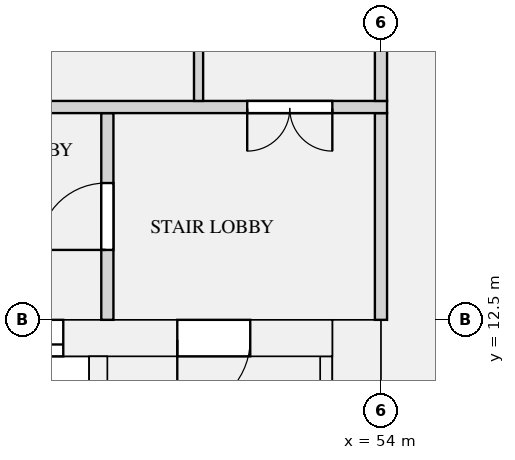
"""IFC4 building model, lengths in metres.
Left out: names, types, materials, properties, quantities, classifications, styles, units other than length and angle.
Written with IfcOpenShell. Run it as: python <this file> out.ifc"""

import sys

from ifc_helpers import new_model, si_unit, direction, frame, frame_2d, origin, place, context, subcontext, project, spatial, rectangle, extrude, element, fill, save


model = new_model("IFC4")
c1 = context("Model", 3, precision=1e-05, world=origin(), true_north=direction((0.0, 1.0)))
c2 = subcontext(c1, "Body", "Model", "MODEL_VIEW")
j1 = project(units=[si_unit("LENGTHUNIT", "METRE"), si_unit("PLANEANGLEUNIT", "RADIAN")], contexts=[c1])
p1 = place(None, origin())
s1 = spatial("IfcSite", under=j1, at=p1, CompositionType="ELEMENT")
p2 = place(p1, origin())
s2 = spatial("IfcBuilding", under=s1, at=p2, CompositionType="ELEMENT")
p3 = place(p2, frame((0.0, 0.0, 111.9)))
s3 = spatial("IfcBuildingStorey", under=s2, at=p3, CompositionType="ELEMENT", Elevation=111.9)
p4 = place(p3, frame((53.6, 0.0, 0.0), z_axis=(0.0, 0.0, 1.0), x_axis=(0.0, 1.0, 0.0)))
e1 = element("IfcWall", 1, at=p4, inside=s3, PredefinedType="SHEAR", context=c2, shape_type="SweptSolid", body=[
    extrude(rectangle(XDim=12.5, YDim=0.8, at=frame_2d((6.25, 0.0))), origin(), (0.0, 0.0, 1.0), 3.15),
])
p5 = place(p3, frame((18.8, 12.2, 0.0), z_axis=(0.0, 0.0, 1.0), x_axis=(1.0, 0.0, 0.0)))
e2 = element("IfcWall", 2, at=p5, inside=s3, PredefinedType="SHEAR", context=c2, shape_type="SweptSolid", body=[
    extrude(rectangle(XDim=34.4, YDim=0.6, at=frame_2d((17.2, 0.0))), origin(), (0.0, 0.0, 1.0), 3.15),
])
p6 = place(p5, frame((24.375, 0.0, 0.0)))
e3 = element("IfcOpeningElement", 3, at=p6, cuts=e2, PredefinedType="OPENING", context=c2, shape_type="SweptSolid", body=[
    extrude(rectangle(XDim=1.1, YDim=2.1, at=frame_2d((0.55, 1.05))), frame((0.0, 0.31, 0.0), z_axis=(0.0, -1.0, 0.0), x_axis=(1.0, 0.0, 0.0)), (0.0, 0.0, 1.0), 0.62),
])
p7 = place(p5, frame((26.625, 0.0, 0.0)))
e4 = element("IfcOpeningElement", 4, at=p7, cuts=e2, PredefinedType="OPENING", context=c2, shape_type="SweptSolid", body=[
    extrude(rectangle(XDim=1.1, YDim=2.1, at=frame_2d((0.55, 1.05))), frame((0.0, 0.31, 0.0), z_axis=(0.0, -1.0, 0.0), x_axis=(1.0, 0.0, 0.0)), (0.0, 0.0, 1.0), 0.62),
])
p8 = place(p5, frame((28.875, 0.0, 0.0)))
e5 = element("IfcOpeningElement", 5, at=p8, cuts=e2, PredefinedType="OPENING", context=c2, shape_type="SweptSolid", body=[
    extrude(rectangle(XDim=1.1, YDim=2.1, at=frame_2d((0.55, 1.05))), frame((0.0, 0.31, 0.0), z_axis=(0.0, -1.0, 0.0), x_axis=(1.0, 0.0, 0.0)), (0.0, 0.0, 1.0), 0.62),
])
p9 = place(p5, frame((8.75, 0.0, 0.0)))
e6 = element("IfcOpeningElement", 6, at=p9, cuts=e2, PredefinedType="OPENING", context=c2, shape_type="SweptSolid", body=[
    extrude(rectangle(XDim=0.9, YDim=2.1, at=frame_2d((0.45, 1.05))), frame((0.0, 0.31, 0.0), z_axis=(0.0, -1.0, 0.0), x_axis=(1.0, 0.0, 0.0)), (0.0, 0.0, 1.0), 0.62),
])
p10 = place(p5, frame((1.35, 0.0, 0.0)))
e7 = element("IfcOpeningElement", 7, at=p10, cuts=e2, PredefinedType="OPENING", context=c2, shape_type="SweptSolid", body=[
    extrude(rectangle(XDim=1.2, YDim=2.1, at=frame_2d((0.6, 1.05))), frame((0.0, 0.31, 0.0), z_axis=(0.0, -1.0, 0.0), x_axis=(1.0, 0.0, 0.0)), (0.0, 0.0, 1.0), 0.62),
])
p11 = place(p5, frame((31.85, 0.0, 0.0)))
e8 = element("IfcOpeningElement", 8, at=p11, cuts=e2, PredefinedType="OPENING", context=c2, shape_type="SweptSolid", body=[
    extrude(rectangle(XDim=1.2, YDim=2.1, at=frame_2d((0.6, 1.05))), frame((0.0, 0.31, 0.0), z_axis=(0.0, -1.0, 0.0), x_axis=(1.0, 0.0, 0.0)), (0.0, 0.0, 1.0), 0.62),
])
p12 = place(p3, frame((53.1, 1.0, 0.0), z_axis=(0.0, 0.0, 1.0), x_axis=(0.0, 1.0, 0.0)))
e9 = element("IfcWall", 9, at=p12, inside=s3, PredefinedType="SHEAR", context=c2, shape_type="SweptSolid", body=[
    extrude(rectangle(XDim=10.9, YDim=0.2, at=frame_2d((5.45, 0.0))), origin(), (0.0, 0.0, 1.0), 3.15),
])
p13 = place(p3, frame((49.35, 8.25, 0.0), z_axis=(0.0, 0.0, 1.0), x_axis=(0.0, 1.0, 0.0)))
e10 = element("IfcWall", 10, at=p13, inside=s3, PredefinedType="SHEAR", context=c2, shape_type="SweptSolid", body=[
    extrude(rectangle(XDim=3.65, YDim=0.3, at=frame_2d((1.825, 0.0))), origin(), (0.0, 0.0, 1.0), 3.15),
])
p14 = place(p3, frame((49.5, 12.5, 0.0), z_axis=(0.0, 0.0, 1.0), x_axis=(0.0, 1.0, 0.0)))
e11 = element("IfcWall", 11, at=p14, inside=s3, PredefinedType="PARTITIONING", context=c2, shape_type="SweptSolid", body=[
    extrude(rectangle(XDim=3.4, YDim=0.2, at=frame_2d((1.7, 0.0))), origin(), (0.0, 0.0, 1.0), 2.83),
])
p15 = place(p14, frame((1.15, 0.0, 0.0)))
e12 = element("IfcOpeningElement", 12, at=p15, cuts=e11, PredefinedType="OPENING", context=c2, shape_type="SweptSolid", body=[
    extrude(rectangle(XDim=1.1, YDim=2.1, at=frame_2d((0.55, 1.05))), frame((0.0, 0.11, 0.0), z_axis=(0.0, -1.0, 0.0), x_axis=(1.0, 0.0, 0.0)), (0.0, 0.0, 1.0), 0.22),
])
p16 = place(p3, frame((54.0, 12.5, 0.0), z_axis=(0.0, 0.0, 1.0), x_axis=(0.0, 1.0, 0.0)))
e13 = element("IfcWall", 13, at=p16, inside=s3, PredefinedType="PARTITIONING", context=c2, shape_type="SweptSolid", body=[
    extrude(rectangle(XDim=3.4, YDim=0.2, at=frame_2d((1.7, 0.0))), origin(), (0.0, 0.0, 1.0), 2.83),
])
p17 = place(p3, frame((17.9, 16.0, 0.0), z_axis=(0.0, 0.0, 1.0), x_axis=(1.0, 0.0, 0.0)))
e14 = element("IfcWall", 14, at=p17, inside=s3, PredefinedType="PARTITIONING", context=c2, shape_type="SweptSolid", body=[
    extrude(rectangle(XDim=36.2, YDim=0.2, at=frame_2d((18.1, 0.0))), origin(), (0.0, 0.0, 1.0), 2.83),
])
p18 = place(p17, frame((0.9, 0.0, 0.0)))
e15 = element("IfcOpeningElement", 15, at=p18, cuts=e14, PredefinedType="OPENING", context=c2, shape_type="SweptSolid", body=[
    extrude(rectangle(XDim=1.4, YDim=2.1, at=frame_2d((0.7, 1.05))), frame((0.0, 0.11, 0.0), z_axis=(0.0, -1.0, 0.0), x_axis=(1.0, 0.0, 0.0)), (0.0, 0.0, 1.0), 0.22),
])
p19 = place(p17, frame((33.9, 0.0, 0.0)))
e16 = element("IfcOpeningElement", 16, at=p19, cuts=e14, PredefinedType="OPENING", context=c2, shape_type="SweptSolid", body=[
    extrude(rectangle(XDim=1.4, YDim=2.1, at=frame_2d((0.7, 1.05))), frame((0.0, 0.11, 0.0), z_axis=(0.0, -1.0, 0.0), x_axis=(1.0, 0.0, 0.0)), (0.0, 0.0, 1.0), 0.22),
])
p20 = place(p3, frame((54.0, 16.1, 0.0), z_axis=(0.0, 0.0, 1.0), x_axis=(0.0, 1.0, 0.0)))
e17 = element("IfcWall", 17, at=p20, inside=s3, PredefinedType="PARTITIONING", context=c2, shape_type="SweptSolid", body=[
    extrude(rectangle(XDim=7.8, YDim=0.2, at=frame_2d((3.9, 0.0))), origin(), (0.0, 0.0, 1.0), 2.83),
])
p21 = place(p20, frame((2.35, 0.0, 0.0)))
e18 = element("IfcOpeningElement", 18, at=p21, cuts=e17, PredefinedType="OPENING", context=c2, shape_type="SweptSolid", body=[
    extrude(rectangle(XDim=1.1, YDim=2.1, at=frame_2d((0.55, 1.05))), frame((0.0, 0.11, 0.0), z_axis=(0.0, -1.0, 0.0), x_axis=(1.0, 0.0, 0.0)), (0.0, 0.0, 1.0), 0.22),
])
p22 = place(p3, frame((51.0, 16.1, 0.0), z_axis=(0.0, 0.0, 1.0), x_axis=(0.0, 1.0, 0.0)))
e19 = element("IfcWall", 19, at=p22, inside=s3, PredefinedType="PARTITIONING", context=c2, shape_type="SweptSolid", body=[
    extrude(rectangle(XDim=4.825, YDim=0.15, at=frame_2d((2.413, 0.0))), origin(), (0.0, 0.0, 1.0), 2.83),
])
p23 = place(p8, origin())
e20 = element("IfcDoor", 20, at=p23, inside=s3, OperationType="DOUBLE_DOOR_SLIDING", PredefinedType="DOOR", context=c2, shape_type="SweptSolid", body=[
    extrude(rectangle(XDim=1.1, YDim=2.1, at=frame_2d((0.55, 1.05))), frame((0.0, 0.025, 0.0), z_axis=(0.0, -1.0, 0.0), x_axis=(1.0, 0.0, 0.0)), (0.0, 0.0, 1.0), 0.05),
])
fill(e5, e20)
p24 = place(p11, frame((1.2, 0.0, 0.0), z_axis=(0.0, 0.0, 1.0), x_axis=(-1.0, 0.0, 0.0)))
e21 = element("IfcDoor", 21, at=p24, inside=s3, OperationType="SINGLE_SWING_RIGHT", PredefinedType="DOOR", context=c2, shape_type="SweptSolid", body=[
    extrude(rectangle(XDim=1.2, YDim=2.1, at=frame_2d((0.6, 1.05))), frame((0.0, 0.025, 0.0), z_axis=(0.0, -1.0, 0.0), x_axis=(1.0, 0.0, 0.0)), (0.0, 0.0, 1.0), 0.05),
])
fill(e8, e21)
p25 = place(p15, origin())
e22 = element("IfcDoor", 22, at=p25, inside=s3, OperationType="SINGLE_SWING_LEFT", PredefinedType="DOOR", context=c2, shape_type="SweptSolid", body=[
    extrude(rectangle(XDim=1.1, YDim=2.1, at=frame_2d((0.55, 1.05))), frame((0.0, 0.025, 0.0), z_axis=(0.0, -1.0, 0.0), x_axis=(1.0, 0.0, 0.0)), (0.0, 0.0, 1.0), 0.05),
])
fill(e12, e22)
p26 = place(p19, frame((1.4, 0.0, 0.0), z_axis=(0.0, 0.0, 1.0), x_axis=(-1.0, 0.0, 0.0)))
e23 = element("IfcDoor", 23, at=p26, inside=s3, OperationType="DOUBLE_DOOR_SINGLE_SWING", PredefinedType="DOOR", context=c2, shape_type="SweptSolid", body=[
    extrude(rectangle(XDim=1.4, YDim=2.1, at=frame_2d((0.7, 1.05))), frame((0.0, 0.025, 0.0), z_axis=(0.0, -1.0, 0.0), x_axis=(1.0, 0.0, 0.0)), (0.0, 0.0, 1.0), 0.05),
])
fill(e16, e23)
save(model, sys.argv[1])
